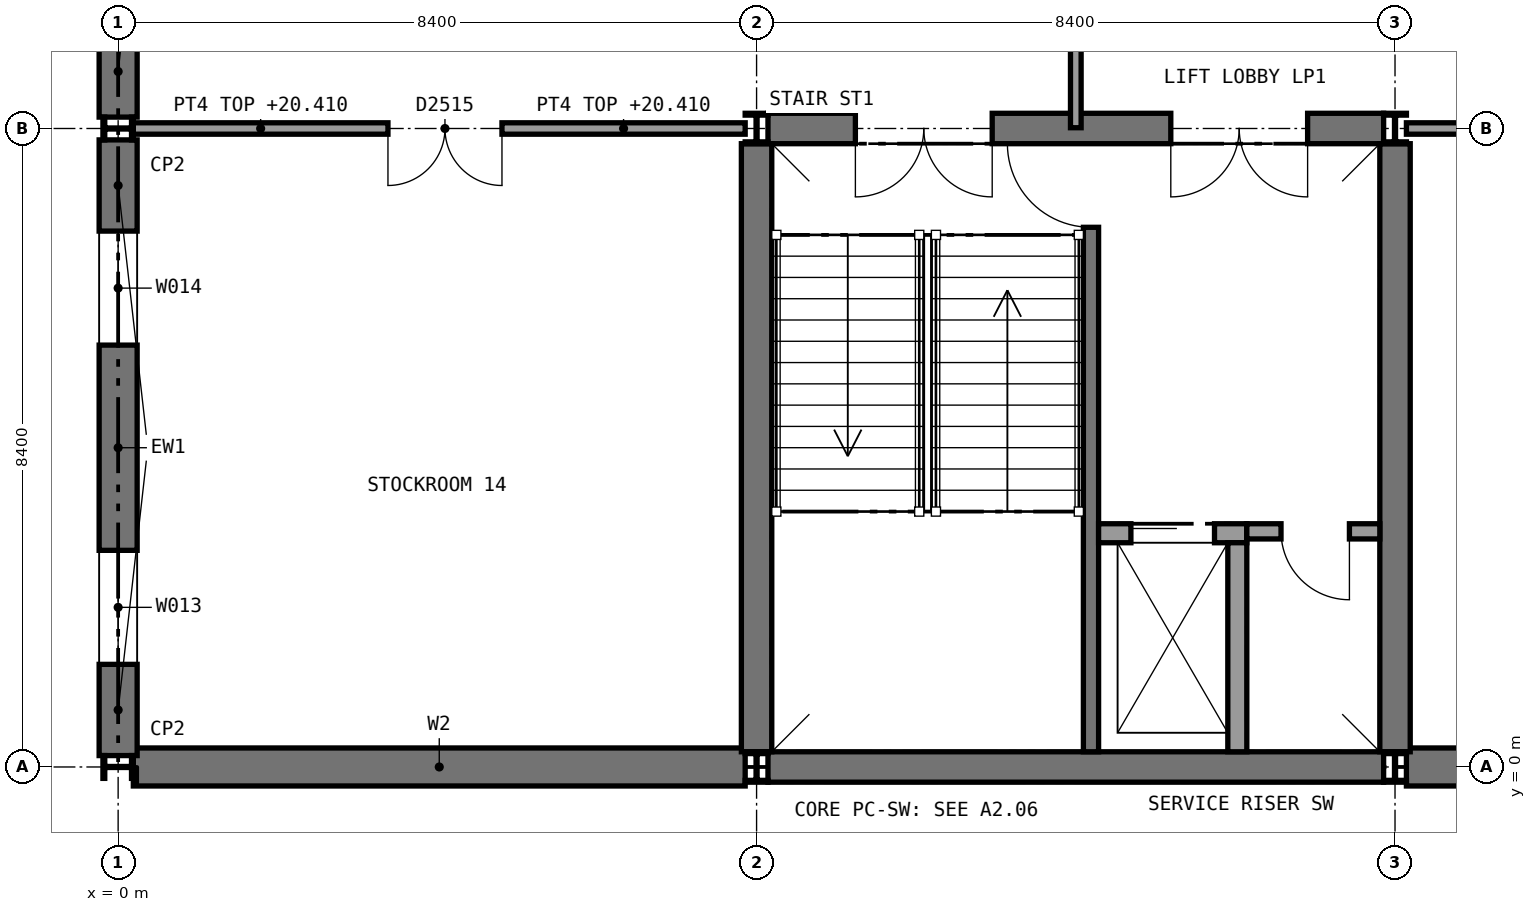
"""IFC4 building model, lengths in metres.
Left out: names, types, materials, properties, quantities, classifications, styles, units other than length and angle.
Written with IfcOpenShell. Run it as: python <this file> out.ifc"""

import sys

from ifc_helpers import new_model, si_unit, direction, frame, frame_2d, origin, origin_2d, place, context, subcontext, project, spatial, rectangle, i_section, extrude, element, fill, save


model = new_model("IFC4")
c1 = context("Model", 3, precision=1e-05, world=origin(), true_north=direction((0.0, 1.0)))
c2 = subcontext(c1, "Body", "Model", "MODEL_VIEW")
j1 = project(units=[si_unit("LENGTHUNIT", "METRE"), si_unit("PLANEANGLEUNIT", "RADIAN")], contexts=[c1])
p1 = place(None, origin())
s1 = spatial("IfcSite", under=j1, at=p1, CompositionType="ELEMENT")
p2 = place(p1, origin())
s2 = spatial("IfcBuilding", under=s1, at=p2, CompositionType="ELEMENT")
p3 = place(p2, frame((0.0, 0.0, 16.2)))
s3 = spatial("IfcBuildingStorey", under=s2, at=p3, CompositionType="ELEMENT", Elevation=16.2)
p4 = place(p3, frame((0.2, 0.0, 0.0), z_axis=(0.0, 0.0, 1.0), x_axis=(1.0, 0.0, 0.0)))
e1 = element("IfcWall", 1, at=p4, inside=s3, PredefinedType="SHEAR", context=c2, shape_type="SweptSolid", body=[
    extrude(rectangle(XDim=8.05, YDim=0.5, at=frame_2d((4.025, 0.0))), origin(), (0.0, 0.0, 1.0), 4.65),
])
p5 = place(p3, frame((16.95, 0.0, 0.0), z_axis=(0.0, 0.0, 1.0), x_axis=(1.0, 0.0, 0.0)))
e2 = element("IfcWall", 2, at=p5, inside=s3, PredefinedType="SHEAR", context=c2, shape_type="SweptSolid", body=[
    extrude(rectangle(XDim=8.1, YDim=0.5, at=frame_2d((4.05, 0.0))), origin(), (0.0, 0.0, 1.0), 4.65),
])
p6 = place(p3, frame((8.55, 0.0, 0.0), z_axis=(0.0, 0.0, 1.0), x_axis=(1.0, 0.0, 0.0)))
e3 = element("IfcWall", 3, at=p6, inside=s3, PredefinedType="SHEAR", context=c2, shape_type="SweptSolid", body=[
    extrude(rectangle(XDim=8.1, YDim=0.4, at=frame_2d((4.05, 0.0))), origin(), (0.0, 0.0, 1.0), 4.65),
])
p7 = place(p3, frame((8.55, 8.4, 0.0), z_axis=(0.0, 0.0, 1.0), x_axis=(1.0, 0.0, 0.0)))
e4 = element("IfcWall", 4, at=p7, inside=s3, PredefinedType="SHEAR", context=c2, shape_type="SweptSolid", body=[
    extrude(rectangle(XDim=8.1, YDim=0.4, at=frame_2d((4.05, 0.0))), origin(), (0.0, 0.0, 1.0), 4.65),
])
p8 = place(p7, frame((1.15, 0.0, 0.0)))
e5 = element("IfcOpeningElement", 5, at=p8, cuts=e4, PredefinedType="OPENING", context=c2, shape_type="SweptSolid", body=[
    extrude(rectangle(XDim=1.8, YDim=2.1, at=frame_2d((0.9, 1.05))), frame((0.0, 0.21, 0.0), z_axis=(0.0, -1.0, 0.0), x_axis=(1.0, 0.0, 0.0)), (0.0, 0.0, 1.0), 0.42),
])
p9 = place(p7, frame((5.3, 0.0, 0.0)))
e6 = element("IfcOpeningElement", 6, at=p9, cuts=e4, PredefinedType="OPENING", context=c2, shape_type="SweptSolid", body=[
    extrude(rectangle(XDim=1.8, YDim=2.1, at=frame_2d((0.9, 1.05))), frame((0.0, 0.21, 0.0), z_axis=(0.0, -1.0, 0.0), x_axis=(1.0, 0.0, 0.0)), (0.0, 0.0, 1.0), 0.42),
])
for number, where, z_axis, x_axis in (
    (7, (8.4, 0.2, 0.0), (0.0, 0.0, 1.0), (0.0, 1.0, 0.0)),
    (8, (16.8, 0.2, 0.0), (0.0, 0.0, 1.0), (0.0, 1.0, 0.0)),
):
    element("IfcWall", number, at=place(p3, frame(where, z_axis=z_axis, x_axis=x_axis)), inside=s3, PredefinedType="SHEAR", context=c2, shape_type="SweptSolid", body=[
        extrude(rectangle(XDim=8.0, YDim=0.4, at=frame_2d((4.0, 0.0))), origin(), (0.0, 0.0, 1.0), 4.65),
    ])
for number, where, z_axis, x_axis in (
    (9, (0.0, 0.0, 0.0), (0.0, 0.0, 1.0), (0.0, 1.0, 0.0)),
    (10, (0.0, 8.4, 0.0), (0.0, 0.0, 1.0), (0.0, 1.0, 0.0)),
    (11, (8.4, 0.0, 0.0), (0.0, 0.0, 1.0), (1.0, 0.0, 0.0)),
    (12, (8.4, 8.4, 0.0), (0.0, 0.0, 1.0), (1.0, 0.0, 0.0)),
    (13, (16.8, 0.0, 0.0), (0.0, 0.0, 1.0), (1.0, 0.0, 0.0)),
    (14, (16.8, 8.4, 0.0), (0.0, 0.0, 1.0), (1.0, 0.0, 0.0)),
):
    element("IfcColumn", number, at=place(p3, frame(where, z_axis=z_axis, x_axis=x_axis)), inside=s3, PredefinedType="COLUMN", context=c2, shape_type="SweptSolid", body=[
        extrude(i_section(OverallWidth=0.3, OverallDepth=0.4, WebThickness=0.013, FlangeThickness=0.024, FilletRadius=0.027, at=origin_2d()), origin(), (0.0, 0.0, 1.0), 4.8),
    ])
p10 = place(p3, frame((16.95, 8.4, 0.0), z_axis=(0.0, 0.0, 1.0), x_axis=(1.0, 0.0, 0.0)))
e15 = element("IfcWall", 15, at=p10, inside=s3, PredefinedType="SOLIDWALL", context=c2, shape_type="SweptSolid", body=[
    extrude(rectangle(XDim=8.1, YDim=0.15, at=frame_2d((4.05, 0.0))), origin(), (0.0, 0.0, 1.0), 4.32),
])
p11 = place(p10, frame((3.35, 0.0, 0.0)))
e16 = element("IfcOpeningElement", 16, at=p11, cuts=e15, PredefinedType="OPENING", context=c2, shape_type="SweptSolid", body=[
    extrude(rectangle(XDim=1.5, YDim=2.1, at=frame_2d((0.75, 1.05))), frame((0.0, 0.085, 0.0), z_axis=(0.0, -1.0, 0.0), x_axis=(1.0, 0.0, 0.0)), (0.0, 0.0, 1.0), 0.17),
])
p12 = place(p3, frame((0.2, 8.4, 0.0), z_axis=(0.0, 0.0, 1.0), x_axis=(1.0, 0.0, 0.0)))
e17 = element("IfcWall", 17, at=p12, inside=s3, PredefinedType="SOLIDWALL", context=c2, shape_type="SweptSolid", body=[
    extrude(rectangle(XDim=8.05, YDim=0.15, at=frame_2d((4.025, 0.0))), origin(), (0.0, 0.0, 1.0), 4.21),
])
p13 = place(p12, frame((3.35, 0.0, 0.0)))
e18 = element("IfcOpeningElement", 18, at=p13, cuts=e17, PredefinedType="OPENING", context=c2, shape_type="SweptSolid", body=[
    extrude(rectangle(XDim=1.5, YDim=2.1, at=frame_2d((0.75, 1.05))), frame((0.0, 0.085, 0.0), z_axis=(0.0, -1.0, 0.0), x_axis=(1.0, 0.0, 0.0)), (0.0, 0.0, 1.0), 0.17),
])
p14 = place(p3, frame((12.6, 8.41, 0.0), z_axis=(0.0, 0.0, 1.0), x_axis=(0.0, 1.0, 0.0)))
e19 = element("IfcWall", 19, at=p14, inside=s3, PredefinedType="PARTITIONING", context=c2, shape_type="SweptSolid", body=[
    extrude(rectangle(XDim=7.6, YDim=0.14, at=frame_2d((3.8, 0.0))), origin(), (0.0, 0.0, 1.0), 4.65),
])
p15 = place(p3, frame((0.0, 0.15, 0.0), z_axis=(0.0, 0.0, 1.0), x_axis=(0.0, 1.0, 0.0)))
e20 = element("IfcWall", 20, at=p15, inside=s3, PredefinedType="STANDARD", context=c2, shape_type="SweptSolid", body=[
    extrude(rectangle(XDim=8.1, YDim=0.5, at=frame_2d((4.05, 0.0))), origin(), (0.0, 0.0, 1.0), 4.65),
])
p16 = place(p15, frame((1.2, 0.0, 1.0)))
e21 = element("IfcOpeningElement", 21, at=p16, cuts=e20, PredefinedType="OPENING", context=c2, shape_type="SweptSolid", body=[
    extrude(rectangle(XDim=1.5, YDim=2.7, at=frame_2d((0.75, 1.35))), frame((0.0, 0.26, 0.0), z_axis=(0.0, -1.0, 0.0), x_axis=(1.0, 0.0, 0.0)), (0.0, 0.0, 1.0), 0.52),
])
p17 = place(p15, frame((5.4, 0.0, 1.0)))
e22 = element("IfcOpeningElement", 22, at=p17, cuts=e20, PredefinedType="OPENING", context=c2, shape_type="SweptSolid", body=[
    extrude(rectangle(XDim=1.5, YDim=2.7, at=frame_2d((0.75, 1.35))), frame((0.0, 0.26, 0.0), z_axis=(0.0, -1.0, 0.0), x_axis=(1.0, 0.0, 0.0)), (0.0, 0.0, 1.0), 0.52),
])
p18 = place(p3, frame((0.0, 8.55, 0.0), z_axis=(0.0, 0.0, 1.0), x_axis=(0.0, 1.0, 0.0)))
e23 = element("IfcWall", 23, at=p18, inside=s3, PredefinedType="STANDARD", context=c2, shape_type="SweptSolid", body=[
    extrude(rectangle(XDim=8.1, YDim=0.5, at=frame_2d((4.05, 0.0))), origin(), (0.0, 0.0, 1.0), 4.65),
])
p19 = place(p18, frame((1.2, 0.0, 1.0)))
e24 = element("IfcOpeningElement", 24, at=p19, cuts=e23, PredefinedType="OPENING", context=c2, shape_type="SweptSolid", body=[
    extrude(rectangle(XDim=1.5, YDim=2.7, at=frame_2d((0.75, 1.35))), frame((0.0, 0.26, 0.0), z_axis=(0.0, -1.0, 0.0), x_axis=(1.0, 0.0, 0.0)), (0.0, 0.0, 1.0), 0.52),
])
p20 = place(p18, frame((5.4, 0.0, 1.0)))
e25 = element("IfcOpeningElement", 25, at=p20, cuts=e23, PredefinedType="OPENING", context=c2, shape_type="SweptSolid", body=[
    extrude(rectangle(XDim=1.5, YDim=2.7, at=frame_2d((0.75, 1.35))), frame((0.0, 0.26, 0.0), z_axis=(0.0, -1.0, 0.0), x_axis=(1.0, 0.0, 0.0)), (0.0, 0.0, 1.0), 0.52),
])
p21 = place(p3, frame((12.8, 0.2, 0.0), z_axis=(0.0, 0.0, 1.0), x_axis=(0.0, 1.0, 0.0)))
e26 = element("IfcWall", 26, at=p21, inside=s3, PredefinedType="SHEAR", context=c2, shape_type="SweptSolid", body=[
    extrude(rectangle(XDim=8.0, YDim=0.2, at=frame_2d((4.0, 0.0))), origin(), (0.0, 0.0, 1.0), 4.65),
])
p22 = place(p21, frame((6.9, 0.0, 0.0)))
e27 = element("IfcOpeningElement", 27, at=p22, cuts=e26, PredefinedType="OPENING", context=c2, shape_type="SweptSolid", body=[
    extrude(rectangle(XDim=1.11, YDim=2.1, at=frame_2d((0.555, 1.05))), frame((0.0, 0.11, 0.0), z_axis=(0.0, -1.0, 0.0), x_axis=(1.0, 0.0, 0.0)), (0.0, 0.0, 1.0), 0.22),
])
p23 = place(p3, frame((12.9, 3.075, 0.0), z_axis=(0.0, 0.0, 1.0), x_axis=(1.0, 0.0, 0.0)))
e28 = element("IfcWall", 28, at=p23, inside=s3, PredefinedType="SOLIDWALL", context=c2, shape_type="SweptSolid", body=[
    extrude(rectangle(XDim=1.95, YDim=0.25, at=frame_2d((0.975, 0.0))), origin(), (0.0, 0.0, 1.0), 4.8),
])
p24 = place(p23, frame((0.425, 0.0, 0.0)))
e29 = element("IfcOpeningElement", 29, at=p24, cuts=e28, PredefinedType="OPENING", context=c2, shape_type="SweptSolid", body=[
    extrude(rectangle(XDim=1.1, YDim=2.1, at=frame_2d((0.55, 1.05))), frame((0.0, 0.135, 0.0), z_axis=(0.0, -1.0, 0.0), x_axis=(1.0, 0.0, 0.0)), (0.0, 0.0, 1.0), 0.27),
])
p25 = place(p3, frame((14.725, 0.2, 0.0), z_axis=(0.0, 0.0, 1.0), x_axis=(0.0, 1.0, 0.0)))
e30 = element("IfcWall", 30, at=p25, inside=s3, PredefinedType="SOLIDWALL", context=c2, shape_type="SweptSolid", body=[
    extrude(rectangle(XDim=2.75, YDim=0.25, at=frame_2d((1.375, 0.0))), origin(), (0.0, 0.0, 1.0), 4.8),
])
p26 = place(p3, frame((14.85, 3.1, 0.0), z_axis=(0.0, 0.0, 1.0), x_axis=(1.0, 0.0, 0.0)))
e31 = element("IfcWall", 31, at=p26, inside=s3, PredefinedType="PARTITIONING", context=c2, shape_type="SweptSolid", body=[
    extrude(rectangle(XDim=1.75, YDim=0.2, at=frame_2d((0.875, 0.0))), origin(), (0.0, 0.0, 1.0), 4.65),
])
p27 = place(p26, frame((0.45, 0.0, 0.0)))
e32 = element("IfcOpeningElement", 32, at=p27, cuts=e31, PredefinedType="OPENING", context=c2, shape_type="SweptSolid", body=[
    extrude(rectangle(XDim=0.9, YDim=2.1, at=frame_2d((0.45, 1.05))), frame((0.0, 0.11, 0.0), z_axis=(0.0, -1.0, 0.0), x_axis=(1.0, 0.0, 0.0)), (0.0, 0.0, 1.0), 0.22),
])
p28 = place(p13, frame((1.5, 0.0, 0.0), z_axis=(0.0, 0.0, 1.0), x_axis=(-1.0, 0.0, 0.0)))
e33 = element("IfcDoor", 33, at=p28, inside=s3, OperationType="DOUBLE_DOOR_SINGLE_SWING", PredefinedType="DOOR", context=c2, shape_type="SweptSolid", body=[
    extrude(rectangle(XDim=1.5, YDim=2.1, at=frame_2d((0.75, 1.05))), frame((0.0, 0.025, 0.0), z_axis=(0.0, -1.0, 0.0), x_axis=(1.0, 0.0, 0.0)), (0.0, 0.0, 1.0), 0.05),
])
fill(e18, e33)
p29 = place(p16, origin())
e34 = element("IfcWindow", 34, at=p29, inside=s3, PartitioningType="SINGLE_PANEL", PredefinedType="WINDOW", context=c2, shape_type="SweptSolid", body=[
    extrude(rectangle(XDim=1.5, YDim=2.7, at=frame_2d((0.75, 1.35))), frame((0.0, 0.03, 0.0), z_axis=(0.0, -1.0, 0.0), x_axis=(1.0, 0.0, 0.0)), (0.0, 0.0, 1.0), 0.06),
])
fill(e21, e34)
p30 = place(p17, origin())
e35 = element("IfcWindow", 35, at=p30, inside=s3, PartitioningType="SINGLE_PANEL", PredefinedType="WINDOW", context=c2, shape_type="SweptSolid", body=[
    extrude(rectangle(XDim=1.5, YDim=2.7, at=frame_2d((0.75, 1.35))), frame((0.0, 0.03, 0.0), z_axis=(0.0, -1.0, 0.0), x_axis=(1.0, 0.0, 0.0)), (0.0, 0.0, 1.0), 0.06),
])
fill(e22, e35)
p31 = place(p22, origin())
e36 = element("IfcDoor", 36, at=p31, inside=s3, OperationType="SINGLE_SWING_RIGHT", PredefinedType="DOOR", context=c2, shape_type="SweptSolid", body=[
    extrude(rectangle(XDim=1.1, YDim=2.1, at=frame_2d((0.55, 1.05))), frame((0.0, 0.025, 0.0), z_axis=(0.0, -1.0, 0.0), x_axis=(1.0, 0.0, 0.0)), (0.0, 0.0, 1.0), 0.05),
])
fill(e27, e36)
p32 = place(p24, origin())
e37 = element("IfcDoor", 37, at=p32, inside=s3, OperationType="SLIDING_TO_LEFT", PredefinedType="DOOR", context=c2, shape_type="SweptSolid", body=[
    extrude(rectangle(XDim=1.1, YDim=2.1, at=frame_2d((0.55, 1.05))), frame((0.0, 0.025, 0.0), z_axis=(0.0, -1.0, 0.0), x_axis=(1.0, 0.0, 0.0)), (0.0, 0.0, 1.0), 0.05),
])
fill(e29, e37)
p33 = place(p27, frame((0.9, 0.0, 0.0), z_axis=(0.0, 0.0, 1.0), x_axis=(-1.0, 0.0, 0.0)))
e38 = element("IfcDoor", 38, at=p33, inside=s3, OperationType="SINGLE_SWING_LEFT", PredefinedType="DOOR", context=c2, shape_type="SweptSolid", body=[
    extrude(rectangle(XDim=0.9, YDim=2.1, at=frame_2d((0.45, 1.05))), frame((0.0, 0.025, 0.0), z_axis=(0.0, -1.0, 0.0), x_axis=(1.0, 0.0, 0.0)), (0.0, 0.0, 1.0), 0.05),
])
fill(e32, e38)
p34 = place(p8, frame((1.8, 0.0, 0.0), z_axis=(0.0, 0.0, 1.0), x_axis=(-1.0, 0.0, 0.0)))
e39 = element("IfcDoor", 39, at=p34, inside=s3, OperationType="DOUBLE_DOOR_SINGLE_SWING", PredefinedType="DOOR", context=c2, shape_type="SweptSolid", body=[
    extrude(rectangle(XDim=1.8, YDim=2.1, at=frame_2d((0.9, 1.05))), frame((0.0, 0.025, 0.0), z_axis=(0.0, -1.0, 0.0), x_axis=(1.0, 0.0, 0.0)), (0.0, 0.0, 1.0), 0.05),
])
fill(e5, e39)
p35 = place(p9, frame((1.8, 0.0, 0.0), z_axis=(0.0, 0.0, 1.0), x_axis=(-1.0, 0.0, 0.0)))
e40 = element("IfcDoor", 40, at=p35, inside=s3, OperationType="DOUBLE_DOOR_SINGLE_SWING", PredefinedType="DOOR", context=c2, shape_type="SweptSolid", body=[
    extrude(rectangle(XDim=1.8, YDim=2.1, at=frame_2d((0.9, 1.05))), frame((0.0, 0.025, 0.0), z_axis=(0.0, -1.0, 0.0), x_axis=(1.0, 0.0, 0.0)), (0.0, 0.0, 1.0), 0.05),
])
fill(e6, e40)
save(model, sys.argv[1])
